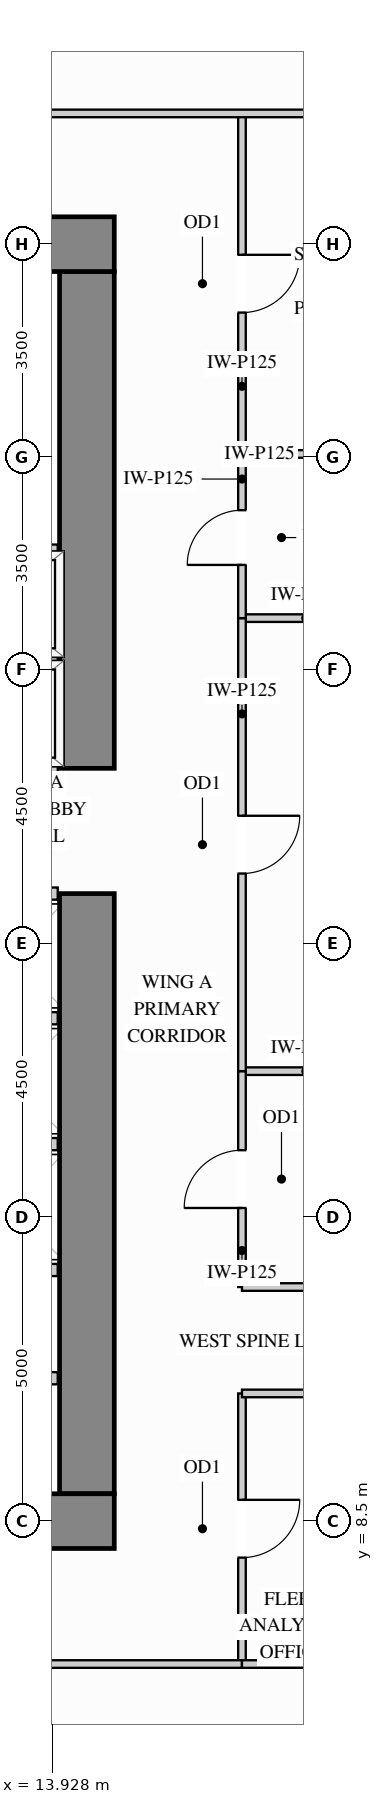
"""IFC4 building model, lengths in metres.
Left out: names, types, materials, properties, quantities, classifications, styles, units other than length and angle.
Written with IfcOpenShell. Run it as: python <this file> out.ifc"""

import sys

from ifc_helpers import new_model, si_unit, direction, frame, frame_2d, origin, place, context, subcontext, project, spatial, rectangle, extrude, source, transform, mapped, element, fill, save


model = new_model("IFC4")
c1 = context("Model", 3, precision=1e-05, world=origin(), true_north=direction((0.0, 1.0)))
c2 = subcontext(c1, "Body", "Model", "MODEL_VIEW")
j1 = project(units=[si_unit("LENGTHUNIT", "METRE"), si_unit("PLANEANGLEUNIT", "RADIAN")], contexts=[c1])
p1 = place(None, origin())
s1 = spatial("IfcSite", under=j1, at=p1, CompositionType="ELEMENT")
p2 = place(p1, origin())
s2 = spatial("IfcBuilding", under=s1, at=p2, CompositionType="ELEMENT")
p3 = place(p2, frame((0.0, 0.0, 40.5)))
s3 = spatial("IfcBuildingStorey", under=s2, at=p3, CompositionType="ELEMENT", Elevation=40.5)
m1 = source(origin(), c2, "Body", "SweptSolid", [
    extrude(rectangle(XDim=9.87, YDim=0.9, at=frame_2d((4.935, 0.0))), origin(), (0.0, 0.0, 1.0), 3.38),
])
p4 = place(p3, frame((14.5, 8.95, 0.0), z_axis=(0.0, 0.0, 1.0), x_axis=(0.0, 1.0, 0.0)))
e1 = element("IfcWall", 1, at=p4, inside=s3, PredefinedType="SHEAR", context=c2, shape_type="MappedRepresentation", body=[
    mapped(m1, transform((0.0, 0.0, 0.0), x_axis=(1.0, 0.0, 0.0), y_axis=(0.0, 1.0, 0.0), z_axis=(0.0, 0.0, 1.0))),
])
m2 = source(origin(), c2, "Body", "SweptSolid", [
    extrude(rectangle(XDim=8.17, YDim=0.9, at=frame_2d((4.085, 0.0))), origin(), (0.0, 0.0, 1.0), 3.38),
])
p5 = place(p3, frame((14.5, 20.88, 0.0), z_axis=(0.0, 0.0, 1.0), x_axis=(0.0, 1.0, 0.0)))
e2 = element("IfcWall", 2, at=p5, inside=s3, PredefinedType="SHEAR", context=c2, shape_type="MappedRepresentation", body=[
    mapped(m2, transform((0.0, 0.0, 0.0), x_axis=(1.0, 0.0, 0.0), y_axis=(0.0, 1.0, 0.0), z_axis=(0.0, 0.0, 1.0))),
])
m3 = source(origin(), c2, "Body", "SweptSolid", [
    extrude(rectangle(XDim=10.9, YDim=0.9, at=frame_2d((5.45, 0.0))), origin(), (0.0, 0.0, 1.0), 3.38),
])
for number, where, z_axis, x_axis in (
    (3, (4.05, 29.5, 0.0), (0.0, 0.0, 1.0), (1.0, 0.0, 0.0)),
    (4, (4.05, 8.5, 0.0), (0.0, 0.0, 1.0), (1.0, 0.0, 0.0)),
):
    element("IfcWall", number, at=place(p3, frame(where, z_axis=z_axis, x_axis=x_axis)), inside=s3, PredefinedType="SHEAR", context=c2, shape_type="MappedRepresentation", body=[
        mapped(m3, transform((0.0, 0.0, 0.0), x_axis=(1.0, 0.0, 0.0), y_axis=(0.0, 1.0, 0.0), z_axis=(0.0, 0.0, 1.0))),
    ])
m4 = source(origin(), c2, "Body", "SweptSolid", [
    extrude(rectangle(XDim=2.1, YDim=0.125, at=frame_2d((1.05, 0.0))), origin(), (0.0, 0.0, 1.0), 3.365),
])
p6 = place(p3, frame((17.05, 15.9, 0.0), z_axis=(0.0, 0.0, 1.0), x_axis=(1.0, 0.0, 0.0)))
e5 = element("IfcWall", 5, at=p6, inside=s3, PredefinedType="PARTITIONING", context=c2, shape_type="MappedRepresentation", body=[
    mapped(m4, transform((0.0, 0.0, 0.0), x_axis=(1.0, 0.0, 0.0), y_axis=(0.0, 1.0, 0.0), z_axis=(0.0, 0.0, 1.0))),
])
m5 = source(origin(), c2, "Body", "SweptSolid", [
    extrude(rectangle(XDim=2.098, YDim=0.125, at=frame_2d((1.049, 0.0))), origin(), (0.0, 0.0, 1.0), 3.365),
])
for number, where, z_axis, x_axis in (
    (6, (17.05, 23.35, 0.0), (0.0, 0.0, 1.0), (1.0, 0.0, 0.0)),
    (7, (17.05, 26.05, 0.0), (0.0, 0.0, 1.0), (1.0, 0.0, 0.0)),
):
    element("IfcWall", number, at=place(p3, frame(where, z_axis=z_axis, x_axis=x_axis)), inside=s3, PredefinedType="PARTITIONING", context=c2, shape_type="MappedRepresentation", body=[
        mapped(m5, transform((0.0, 0.0, 0.0), x_axis=(1.0, 0.0, 0.0), y_axis=(0.0, 1.0, 0.0), z_axis=(0.0, 0.0, 1.0))),
    ])
p7 = place(p3, frame((17.05, 12.35, 0.0), z_axis=(0.0, 0.0, 1.0), x_axis=(0.0, 1.0, 0.0)))
e8 = element("IfcWall", 8, at=p7, inside=s3, PredefinedType="PARTITIONING", context=c2, shape_type="SweptSolid", body=[
    extrude(rectangle(XDim=3.55, YDim=0.125, at=frame_2d((1.775, 0.0))), origin(), (0.0, 0.0, 1.0), 3.365),
])
p8 = place(p7, frame((1.3, 0.0, 0.0)))
e9 = element("IfcOpeningElement", 9, at=p8, cuts=e8, PredefinedType="OPENING", context=c2, shape_type="SweptSolid", body=[
    extrude(rectangle(XDim=0.95, YDim=2.15, at=frame_2d((0.475, 1.075))), frame((0.0, 0.073, 0.0), z_axis=(0.0, -1.0, 0.0), x_axis=(1.0, 0.0, 0.0)), (0.0, 0.0, 1.0), 0.145),
])
p9 = place(p3, frame((17.05, 15.9, 0.0), z_axis=(0.0, 0.0, 1.0), x_axis=(0.0, 1.0, 0.0)))
e10 = element("IfcWall", 10, at=p9, inside=s3, PredefinedType="PARTITIONING", context=c2, shape_type="SweptSolid", body=[
    extrude(rectangle(XDim=7.45, YDim=0.125, at=frame_2d((3.725, 0.0))), origin(), (0.0, 0.0, 1.0), 3.365),
])
p10 = place(p9, frame((3.25, 0.0, 0.0)))
e11 = element("IfcOpeningElement", 11, at=p10, cuts=e10, PredefinedType="OPENING", context=c2, shape_type="SweptSolid", body=[
    extrude(rectangle(XDim=0.95, YDim=2.15, at=frame_2d((0.475, 1.075))), frame((0.0, 0.073, 0.0), z_axis=(0.0, -1.0, 0.0), x_axis=(1.0, 0.0, 0.0)), (0.0, 0.0, 1.0), 0.145),
])
p11 = place(p3, frame((17.05, 26.05, 0.0), z_axis=(0.0, 0.0, 1.0), x_axis=(0.0, 1.0, 0.0)))
e12 = element("IfcWall", 12, at=p11, inside=s3, PredefinedType="PARTITIONING", context=c2, shape_type="SweptSolid", body=[
    extrude(rectangle(XDim=5.6, YDim=0.125, at=frame_2d((2.8, 0.0))), origin(), (0.0, 0.0, 1.0), 3.365),
])
p12 = place(p11, frame((2.325, 0.0, 0.0)))
e13 = element("IfcOpeningElement", 13, at=p12, cuts=e12, PredefinedType="OPENING", context=c2, shape_type="SweptSolid", body=[
    extrude(rectangle(XDim=0.95, YDim=2.15, at=frame_2d((0.475, 1.075))), frame((0.0, 0.073, 0.0), z_axis=(0.0, -1.0, 0.0), x_axis=(1.0, 0.0, 0.0)), (0.0, 0.0, 1.0), 0.145),
])
p13 = place(p3, frame((17.05, 6.15, 0.0), z_axis=(0.0, 0.0, 1.0), x_axis=(0.0, 1.0, 0.0)))
e14 = element("IfcWall", 14, at=p13, inside=s3, PredefinedType="PARTITIONING", context=c2, shape_type="SweptSolid", body=[
    extrude(rectangle(XDim=4.45, YDim=0.125, at=frame_2d((2.225, 0.0))), origin(), (0.0, 0.0, 1.0), 3.365),
])
p14 = place(p13, frame((1.75, 0.0, 0.0)))
e15 = element("IfcOpeningElement", 15, at=p14, cuts=e14, PredefinedType="OPENING", context=c2, shape_type="SweptSolid", body=[
    extrude(rectangle(XDim=0.95, YDim=2.15, at=frame_2d((0.475, 1.075))), frame((0.0, 0.073, 0.0), z_axis=(0.0, -1.0, 0.0), x_axis=(1.0, 0.0, 0.0)), (0.0, 0.0, 1.0), 0.145),
])
p15 = place(p3, frame((17.05, 23.35, 0.0), z_axis=(0.0, 0.0, 1.0), x_axis=(0.0, 1.0, 0.0)))
e16 = element("IfcWall", 16, at=p15, inside=s3, PredefinedType="PARTITIONING", context=c2, shape_type="SweptSolid", body=[
    extrude(rectangle(XDim=2.7, YDim=0.125, at=frame_2d((1.35, 0.0))), origin(), (0.0, 0.0, 1.0), 3.365),
])
p16 = place(p15, frame((0.875, 0.0, 0.0)))
e17 = element("IfcOpeningElement", 17, at=p16, cuts=e16, PredefinedType="OPENING", context=c2, shape_type="SweptSolid", body=[
    extrude(rectangle(XDim=0.9, YDim=2.15, at=frame_2d((0.45, 1.075))), frame((0.0, 0.073, 0.0), z_axis=(0.0, -1.0, 0.0), x_axis=(1.0, 0.0, 0.0)), (0.0, 0.0, 1.0), 0.145),
])
m6 = source(origin(), c2, "Body", "SweptSolid", [
    extrude(rectangle(XDim=5.798, YDim=0.125, at=frame_2d((2.899, 0.0))), origin(), (0.0, 0.0, 1.0), 2.828),
])
p17 = place(p3, frame((13.35, 31.65, 0.0), z_axis=(0.0, 0.0, 1.0), x_axis=(1.0, 0.0, 0.0)))
e18 = element("IfcWall", 18, at=p17, inside=s3, PredefinedType="PARTITIONING", context=c2, shape_type="MappedRepresentation", body=[
    mapped(m6, transform((0.0, 0.0, 0.0), x_axis=(1.0, 0.0, 0.0), y_axis=(0.0, 1.0, 0.0), z_axis=(0.0, 0.0, 1.0))),
])
m7 = source(origin(), c2, "Body", "SweptSolid", [
    extrude(rectangle(XDim=2.45, YDim=0.125, at=frame_2d((1.225, 0.0))), origin(), (0.0, 0.0, 1.0), 3.365),
])
for number, where, z_axis, x_axis in (
    (19, (17.05, 12.35, 0.0), (0.0, 0.0, 1.0), (1.0, 0.0, 0.0)),
    (20, (17.05, 10.6, 0.0), (0.0, 0.0, 1.0), (1.0, 0.0, 0.0)),
):
    element("IfcWall", number, at=place(p3, frame(where, z_axis=z_axis, x_axis=x_axis)), inside=s3, PredefinedType="PARTITIONING", context=c2, shape_type="MappedRepresentation", body=[
        mapped(m7, transform((0.0, 0.0, 0.0), x_axis=(1.0, 0.0, 0.0), y_axis=(0.0, 1.0, 0.0), z_axis=(0.0, 0.0, 1.0))),
    ])
p18 = place(p3, frame((9.385, 6.15, 0.0), z_axis=(0.0, 0.0, 1.0), x_axis=(1.0, 0.0, 0.0)))
e21 = element("IfcWall", 21, at=p18, inside=s3, PredefinedType="PARTITIONING", context=c2, shape_type="SweptSolid", body=[
    extrude(rectangle(XDim=7.665, YDim=0.125, at=frame_2d((3.833, 0.0))), origin(), (0.0, 0.0, 1.0), 3.365),
])
p19 = place(p18, frame((3.357, 0.0, 0.0)))
e22 = element("IfcOpeningElement", 22, at=p19, cuts=e21, PredefinedType="OPENING", context=c2, shape_type="SweptSolid", body=[
    extrude(rectangle(XDim=0.95, YDim=2.15, at=frame_2d((0.475, 1.075))), frame((0.0, 0.073, 0.0), z_axis=(0.0, -1.0, 0.0), x_axis=(1.0, 0.0, 0.0)), (0.0, 0.0, 1.0), 0.145),
])
p20 = place(p3, frame((17.05, 6.15, 0.0), z_axis=(0.0, 0.0, 1.0), x_axis=(1.0, 0.0, 0.0)))
e23 = element("IfcWall", 23, at=p20, inside=s3, PredefinedType="PARTITIONING", context=c2, shape_type="MappedRepresentation", body=[
    mapped(m5, transform((0.0, 0.0, 0.0), x_axis=(1.0, 0.0, 0.0), y_axis=(0.0, 1.0, 0.0), z_axis=(0.0, 0.0, 1.0))),
])
m8 = source(origin(), c2, "Body", "SweptSolid", [
    extrude(rectangle(XDim=1.6, YDim=0.2, at=frame_2d((0.8, 0.0))), origin(), (0.0, 0.0, 1.0), 3.365),
])
p21 = place(p3, frame((12.42, 10.85, 0.0), z_axis=(0.0, 0.0, 1.0), x_axis=(1.0, 0.0, 0.0)))
e24 = element("IfcWall", 24, at=p21, inside=s3, PredefinedType="PARTITIONING", context=c2, shape_type="MappedRepresentation", body=[
    mapped(m8, transform((0.0, 0.0, 0.0), x_axis=(1.0, 0.0, 0.0), y_axis=(0.0, 1.0, 0.0), z_axis=(0.0, 0.0, 1.0))),
])
m9 = source(origin(), c2, "Body", "SweptSolid", [
    extrude(rectangle(XDim=2.19, YDim=0.2, at=frame_2d((1.095, 0.0))), origin(), (0.0, 0.0, 1.0), 3.365),
])
for number, where, z_axis, x_axis in (
    (25, (11.83, 22.66, 0.0), (0.0, 0.0, 1.0), (1.0, 0.0, 0.0)),
    (26, (11.83, 20.9, 0.0), (0.0, 0.0, 1.0), (1.0, 0.0, 0.0)),
    (27, (11.83, 24.46, 0.0), (0.0, 0.0, 1.0), (1.0, 0.0, 0.0)),
):
    element("IfcWall", number, at=place(p3, frame(where, z_axis=z_axis, x_axis=x_axis)), inside=s3, PredefinedType="PARTITIONING", context=c2, shape_type="MappedRepresentation", body=[
        mapped(m9, transform((0.0, 0.0, 0.0), x_axis=(1.0, 0.0, 0.0), y_axis=(0.0, 1.0, 0.0), z_axis=(0.0, 0.0, 1.0))),
    ])
m10 = source(origin(), c2, "Body", "SweptSolid", [
    extrude(rectangle(XDim=1.79, YDim=0.2, at=frame_2d((0.895, 0.0))), origin(), (0.0, 0.0, 1.0), 3.365),
])
for number, where, z_axis, x_axis in (
    (28, (12.23, 14.7, 0.0), (0.0, 0.0, 1.0), (1.0, 0.0, 0.0)),
    (29, (12.23, 12.63, 0.0), (0.0, 0.0, 1.0), (1.0, 0.0, 0.0)),
    (30, (12.23, 16.77, 0.0), (0.0, 0.0, 1.0), (1.0, 0.0, 0.0)),
    (31, (12.23, 18.82, 0.0), (0.0, 0.0, 1.0), (1.0, 0.0, 0.0)),
):
    element("IfcWall", number, at=place(p3, frame(where, z_axis=z_axis, x_axis=x_axis)), inside=s3, PredefinedType="PARTITIONING", context=c2, shape_type="MappedRepresentation", body=[
        mapped(m10, transform((0.0, 0.0, 0.0), x_axis=(1.0, 0.0, 0.0), y_axis=(0.0, 1.0, 0.0), z_axis=(0.0, 0.0, 1.0))),
    ])
m11 = source(origin(), c2, "Body", "SweptSolid", [
    extrude(rectangle(XDim=0.95, YDim=2.15, at=frame_2d((0.475, 1.075))), frame((0.0, 0.025, 0.0), z_axis=(0.0, -1.0, 0.0), x_axis=(1.0, 0.0, 0.0)), (0.0, 0.0, 1.0), 0.05),
])
p22 = place(p14, origin())
e32 = element("IfcDoor", 32, at=p22, inside=s3, OperationType="SINGLE_SWING_RIGHT", PredefinedType="DOOR", context=c2, shape_type="MappedRepresentation", body=[
    mapped(m11, transform((0.0, 0.0, 0.0), x_axis=(1.0, 0.0, 0.0), y_axis=(0.0, 1.0, 0.0), z_axis=(0.0, 0.0, 1.0))),
])
fill(e15, e32)
p23 = place(p8, origin())
e33 = element("IfcDoor", 33, at=p23, inside=s3, OperationType="SINGLE_SWING_LEFT", PredefinedType="DOOR", context=c2, shape_type="MappedRepresentation", body=[
    mapped(m11, transform((0.0, 0.0, 0.0), x_axis=(1.0, 0.0, 0.0), y_axis=(0.0, 1.0, 0.0), z_axis=(0.0, 0.0, 1.0))),
])
fill(e9, e33)
p24 = place(p10, origin())
e34 = element("IfcDoor", 34, at=p24, inside=s3, OperationType="SINGLE_SWING_RIGHT", PredefinedType="DOOR", context=c2, shape_type="MappedRepresentation", body=[
    mapped(m11, transform((0.0, 0.0, 0.0), x_axis=(1.0, 0.0, 0.0), y_axis=(0.0, 1.0, 0.0), z_axis=(0.0, 0.0, 1.0))),
])
fill(e11, e34)
p25 = place(p12, origin())
e35 = element("IfcDoor", 35, at=p25, inside=s3, OperationType="SINGLE_SWING_RIGHT", PredefinedType="DOOR", context=c2, shape_type="MappedRepresentation", body=[
    mapped(m11, transform((0.0, 0.0, 0.0), x_axis=(1.0, 0.0, 0.0), y_axis=(0.0, 1.0, 0.0), z_axis=(0.0, 0.0, 1.0))),
])
fill(e13, e35)
m12 = source(origin(), c2, "Body", "SweptSolid", [
    extrude(rectangle(XDim=0.9, YDim=2.15, at=frame_2d((0.45, 1.075))), frame((0.0, 0.025, 0.0), z_axis=(0.0, -1.0, 0.0), x_axis=(1.0, 0.0, 0.0)), (0.0, 0.0, 1.0), 0.05),
])
p26 = place(p16, origin())
e36 = element("IfcDoor", 36, at=p26, inside=s3, OperationType="SINGLE_SWING_LEFT", PredefinedType="DOOR", context=c2, shape_type="MappedRepresentation", body=[
    mapped(m12, transform((0.0, 0.0, 0.0), x_axis=(1.0, 0.0, 0.0), y_axis=(0.0, 1.0, 0.0), z_axis=(0.0, 0.0, 1.0))),
])
fill(e17, e36)
save(model, sys.argv[1])
